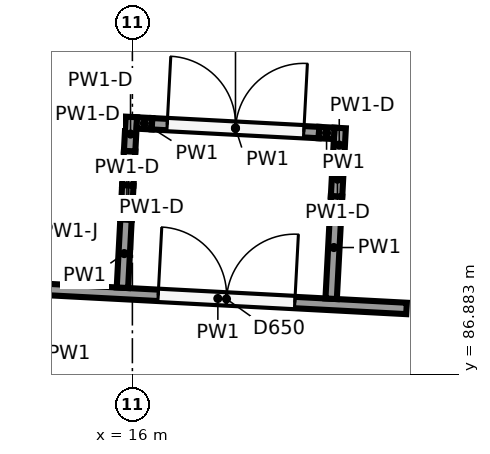
"""IFC4 building model, lengths in metres.
Left out: names, types, materials, properties, quantities, classifications, styles, units other than length and angle.
Written with IfcOpenShell. Run it as: python <this file> out.ifc"""

import sys

from ifc_helpers import new_model, si_unit, direction, frame, frame_2d, origin, place, context, subcontext, project, spatial, rectangle, extrude, element, fill, save


model = new_model("IFC4")
c1 = context("Model", 3, precision=1e-05, world=origin(), true_north=direction((0.0, 1.0)))
c2 = subcontext(c1, "Body", "Model", "MODEL_VIEW")
j1 = project(units=[si_unit("LENGTHUNIT", "METRE"), si_unit("PLANEANGLEUNIT", "RADIAN")], contexts=[c1])
p1 = place(None, origin())
s1 = spatial("IfcSite", under=j1, at=p1, CompositionType="ELEMENT")
p2 = place(p1, origin())
s2 = spatial("IfcBuilding", under=s1, at=p2, CompositionType="ELEMENT")
p3 = place(p2, frame((0.0, 0.0, 6.5)))
s3 = spatial("IfcBuildingStorey", under=s2, at=p3, CompositionType="ELEMENT", Elevation=6.5)
p4 = place(p3, frame((14.642, 88.012, 0.0), z_axis=(0.0, 0.0, 1.0), x_axis=(0.998613893233, -0.052633565738, 0.0)))
e1 = element("IfcWall", 1, at=p4, inside=s3, PredefinedType="PARTITIONING", context=c2, shape_type="SweptSolid", body=[
    extrude(rectangle(XDim=4.972, YDim=0.15, at=frame_2d((2.486, 0.0))), origin(), (0.0, 0.0, 1.0), 5.15),
])
p5 = place(p4, frame((1.7, 0.0, 0.0)))
e2 = element("IfcOpeningElement", 2, at=p5, cuts=e1, PredefinedType="OPENING", context=c2, shape_type="SweptSolid", body=[
    extrude(rectangle(XDim=1.8, YDim=2.1, at=frame_2d((0.9, 1.05))), frame((0.0, 0.085, 0.0), z_axis=(0.0, -1.0, 0.0), x_axis=(1.0, 0.0, 0.0)), (0.0, 0.0, 1.0), 0.17),
])
p6 = place(p3, frame((15.869, 88.022, 0.0), z_axis=(0.0, 0.0, 1.0), x_axis=(0.052630027564, 0.998614079712, 0.0)))
e3 = element("IfcWall", 3, at=p6, inside=s3, PredefinedType="PARTITIONING", context=c2, shape_type="SweptSolid", body=[
    extrude(rectangle(XDim=0.9, YDim=0.15, at=frame_2d((0.45, 0.0))), origin(), (0.0, 0.0, 1.0), 5.15),
])
p7 = place(p3, frame((15.916, 88.921, 0.0), z_axis=(0.0, 0.0, 1.0), x_axis=(0.052615773272, 0.998614830855, 0.0)))
e4 = element("IfcWall", 4, at=p7, inside=s3, PredefinedType="PARTITIONING", context=c2, shape_type="SweptSolid", body=[
    extrude(rectangle(XDim=0.45, YDim=0.15, at=frame_2d((0.225, 0.0))), origin(), (0.0, 0.0, 1.0), 3.85),
])
p8 = place(p3, frame((15.94, 89.37, 0.0), z_axis=(0.0, 0.0, 1.0), x_axis=(0.052644289572, 0.998613327958, 0.0)))
e5 = element("IfcWall", 5, at=p8, inside=s3, PredefinedType="PARTITIONING", context=c2, shape_type="SweptSolid", body=[
    extrude(rectangle(XDim=0.45, YDim=0.15, at=frame_2d((0.225, 0.0))), origin(), (0.0, 0.0, 1.0), 3.85),
])
p9 = place(p3, frame((15.964, 89.82, 0.0), z_axis=(0.0, 0.0, 1.0), x_axis=(0.052615773272, 0.998614830855, 0.0)))
e6 = element("IfcWall", 6, at=p9, inside=s3, PredefinedType="PARTITIONING", context=c2, shape_type="SweptSolid", body=[
    extrude(rectangle(XDim=0.45, YDim=0.15, at=frame_2d((0.225, 0.0))), origin(), (0.0, 0.0, 1.0), 3.85),
])
p10 = place(p3, frame((18.615, 87.877, 0.0), z_axis=(0.0, 0.0, 1.0), x_axis=(0.05280561474, 0.998604810249, 0.0)))
e7 = element("IfcWall", 7, at=p10, inside=s3, PredefinedType="PARTITIONING", context=c2, shape_type="SweptSolid", body=[
    extrude(rectangle(XDim=1.35, YDim=0.15, at=frame_2d((0.675, 0.0))), origin(), (0.0, 0.0, 1.0), 5.15),
])
p11 = place(p3, frame((18.686, 89.226, 0.0), z_axis=(0.0, 0.0, 1.0), x_axis=(0.052644289572, 0.998613327958, 0.0)))
e8 = element("IfcWall", 8, at=p11, inside=s3, PredefinedType="PARTITIONING", context=c2, shape_type="SweptSolid", body=[
    extrude(rectangle(XDim=0.45, YDim=0.15, at=frame_2d((0.225, 0.0))), origin(), (0.0, 0.0, 1.0), 3.85),
])
p12 = place(p3, frame((18.71, 89.675, 0.0), z_axis=(0.0, 0.0, 1.0), x_axis=(0.052615773272, 0.998614830855, 0.0)))
e9 = element("IfcWall", 9, at=p12, inside=s3, PredefinedType="PARTITIONING", context=c2, shape_type="SweptSolid", body=[
    extrude(rectangle(XDim=0.45, YDim=0.15, at=frame_2d((0.225, 0.0))), origin(), (0.0, 0.0, 1.0), 3.85),
])
p13 = place(p3, frame((16.058, 90.19, 0.0), z_axis=(0.0, 0.0, 1.0), x_axis=(0.998621199675, -0.05249475744, 0.0)))
e10 = element("IfcWall", 10, at=p13, inside=s3, PredefinedType="PARTITIONING", context=c2, shape_type="SweptSolid", body=[
    extrude(rectangle(XDim=0.2, YDim=0.15, at=frame_2d((0.1, 0.0))), origin(), (0.0, 0.0, 1.0), 5.15),
])
p14 = place(p3, frame((16.258, 90.18, 0.0), z_axis=(0.0, 0.0, 1.0), x_axis=(0.998615682679, -0.052599603688, 0.0)))
e11 = element("IfcWall", 11, at=p14, inside=s3, PredefinedType="PARTITIONING", context=c2, shape_type="SweptSolid", body=[
    extrude(rectangle(XDim=2.2, YDim=0.15, at=frame_2d((1.1, 0.0))), origin(), (0.0, 0.0, 1.0), 5.15),
])
p15 = place(p14, frame((0.2, 0.0, 0.0)))
e12 = element("IfcOpeningElement", 12, at=p15, cuts=e11, PredefinedType="OPENING", context=c2, shape_type="SweptSolid", body=[
    extrude(rectangle(XDim=1.8, YDim=2.1, at=frame_2d((0.9, 1.05))), frame((0.0, 0.085, 0.0), z_axis=(0.0, -1.0, 0.0), x_axis=(1.0, 0.0, 0.0)), (0.0, 0.0, 1.0), 0.17),
])
p16 = place(p3, frame((18.455, 90.064, 0.0), z_axis=(0.0, 0.0, 1.0), x_axis=(0.998556464137, -0.053712083646, 0.0)))
e13 = element("IfcWall", 13, at=p16, inside=s3, PredefinedType="PARTITIONING", context=c2, shape_type="SweptSolid", body=[
    extrude(rectangle(XDim=0.2, YDim=0.15, at=frame_2d((0.1, 0.0))), origin(), (0.0, 0.0, 1.0), 5.15),
])
p17 = place(p5, origin())
e14 = element("IfcDoor", 14, at=p17, inside=s3, OperationType="DOUBLE_DOOR_SINGLE_SWING", PredefinedType="DOOR", context=c2, shape_type="SweptSolid", body=[
    extrude(rectangle(XDim=1.8, YDim=2.1, at=frame_2d((0.9, 1.05))), frame((0.0, 0.025, 0.0), z_axis=(0.0, -1.0, 0.0), x_axis=(1.0, 0.0, 0.0)), (0.0, 0.0, 1.0), 0.05),
])
fill(e2, e14)
p18 = place(p15, origin())
e15 = element("IfcDoor", 15, at=p18, inside=s3, OperationType="DOUBLE_DOOR_SINGLE_SWING", PredefinedType="DOOR", context=c2, shape_type="SweptSolid", body=[
    extrude(rectangle(XDim=1.8, YDim=2.1, at=frame_2d((0.9, 1.05))), frame((0.0, 0.025, 0.0), z_axis=(0.0, -1.0, 0.0), x_axis=(1.0, 0.0, 0.0)), (0.0, 0.0, 1.0), 0.05),
])
fill(e12, e15)
save(model, sys.argv[1])
